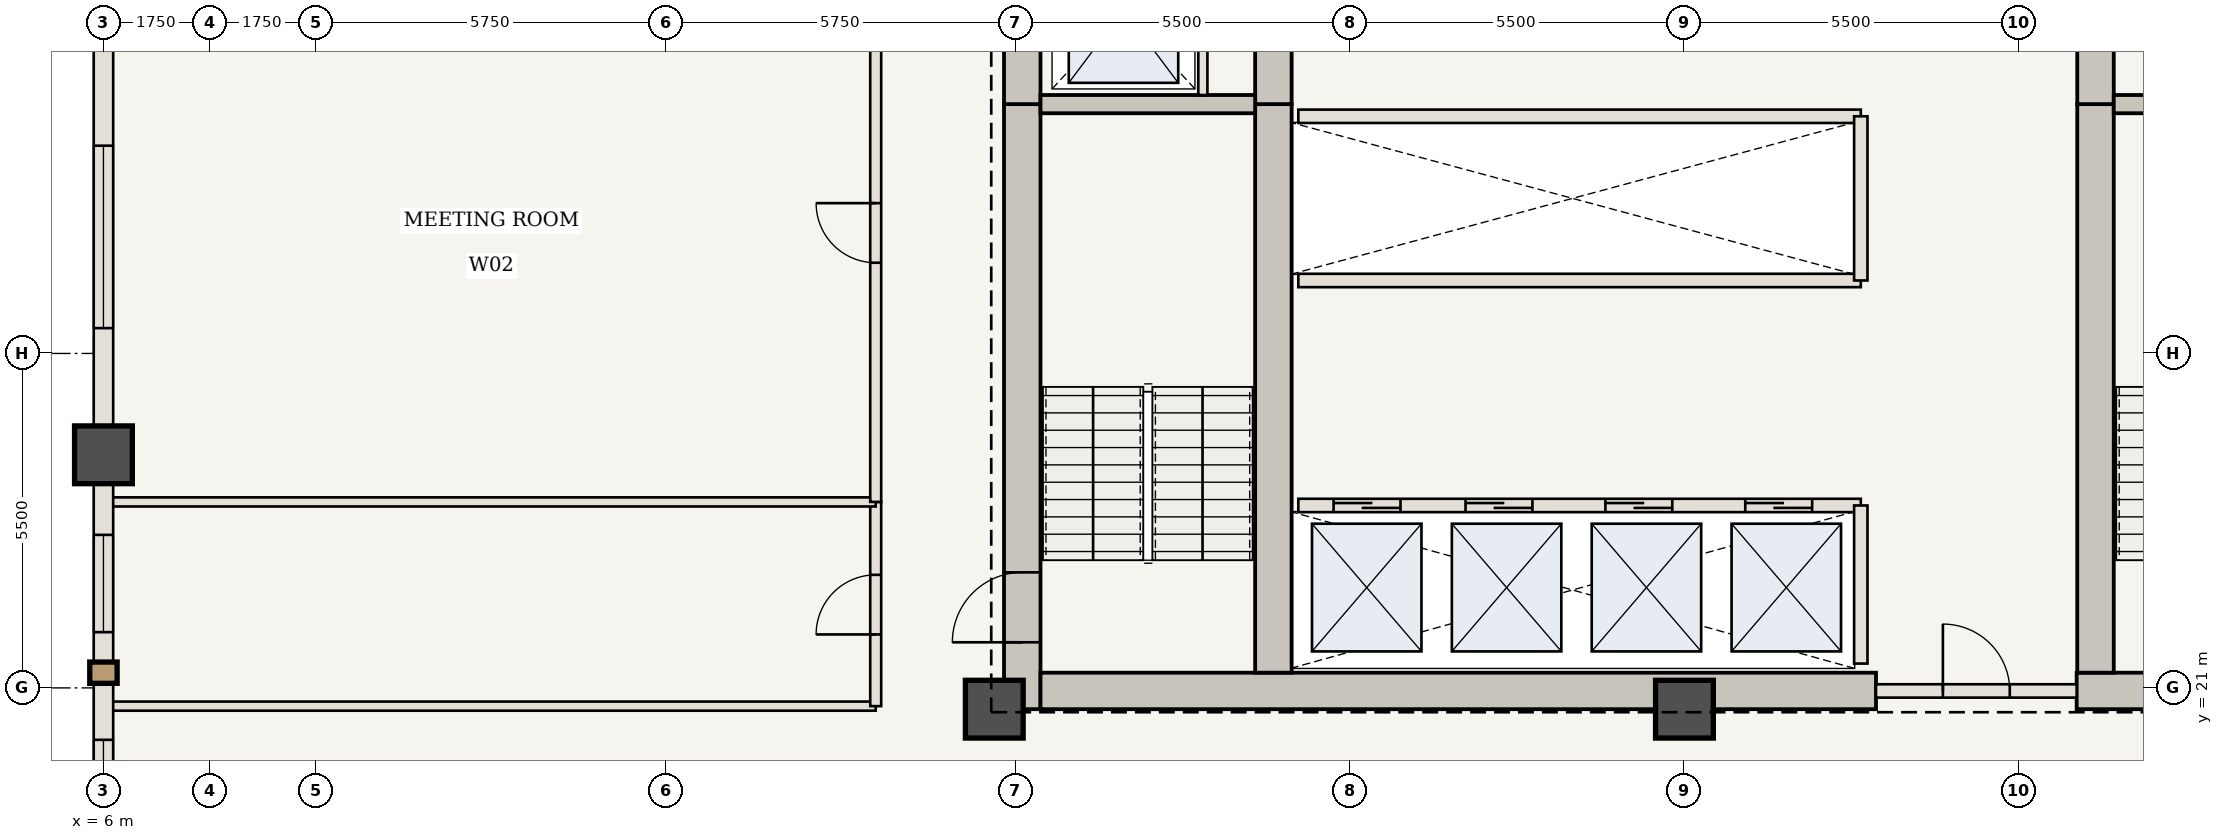
"""IFC4 building model, lengths in metres.
Left out: names, types, materials, properties, quantities, classifications, styles, units other than length and angle.
Written with IfcOpenShell. Run it as: python <this file> out.ifc"""

import sys

from ifc_helpers import new_model, si_unit, direction, frame, frame_2d, origin, origin_2d, place, context, subcontext, project, spatial, rectangle, extrude, element, fill, save


model = new_model("IFC4")
c1 = context("Model", 3, precision=1e-05, world=origin(), true_north=direction((0.0, 1.0)))
c2 = subcontext(c1, "Body", "Model", "MODEL_VIEW")
j1 = project(units=[si_unit("LENGTHUNIT", "METRE"), si_unit("PLANEANGLEUNIT", "RADIAN")], contexts=[c1])
p1 = place(None, origin())
s1 = spatial("IfcSite", under=j1, at=p1, CompositionType="ELEMENT")
p2 = place(p1, origin())
s2 = spatial("IfcBuilding", under=s1, at=p2, CompositionType="ELEMENT")
p3 = place(p2, frame((0.0, 0.0, 137.55)))
s3 = spatial("IfcBuildingStorey", under=s2, at=p3, CompositionType="ELEMENT", Elevation=137.55)
p4 = place(p3, frame((21.11, 20.65, 0.0), z_axis=(0.0, 0.0, 1.0), x_axis=(0.0, 1.0, 0.0)))
e1 = element("IfcWall", 1, at=p4, inside=s3, PredefinedType="SHEAR", context=c2, shape_type="SweptSolid", body=[
    extrude(rectangle(XDim=9.95, YDim=0.6, at=frame_2d((4.975, 0.0))), origin(), (0.0, 0.0, 1.0), 3.85),
])
p5 = place(p4, frame((1.1, 0.0, 0.0)))
e2 = element("IfcOpeningElement", 2, at=p5, cuts=e1, PredefinedType="OPENING", context=c2, shape_type="SweptSolid", body=[
    extrude(rectangle(XDim=1.15, YDim=2.15, at=frame_2d((0.575, 1.075))), frame((0.0, 0.31, 0.0), z_axis=(0.0, -1.0, 0.0), x_axis=(1.0, 0.0, 0.0)), (0.0, 0.0, 1.0), 0.62),
])
p6 = place(p3, frame((21.11, 30.6, 0.0), z_axis=(0.0, 0.0, 1.0), x_axis=(0.0, 1.0, 0.0)))
e3 = element("IfcWall", 3, at=p6, inside=s3, PredefinedType="SHEAR", context=c2, shape_type="SweptSolid", body=[
    extrude(rectangle(XDim=12.7, YDim=0.6, at=frame_2d((6.35, 0.0))), origin(), (0.0, 0.0, 1.0), 3.85),
])
p7 = place(p6, frame((4.2, 0.0, 0.0)))
e4 = element("IfcOpeningElement", 4, at=p7, cuts=e3, PredefinedType="OPENING", context=c2, shape_type="SweptSolid", body=[
    extrude(rectangle(XDim=1.1, YDim=2.15, at=frame_2d((0.55, 1.075))), frame((0.0, 0.31, 0.0), z_axis=(0.0, -1.0, 0.0), x_axis=(1.0, 0.0, 0.0)), (0.0, 0.0, 1.0), 0.62),
])
p8 = place(p6, frame((9.2, 0.0, 0.0)))
e5 = element("IfcOpeningElement", 5, at=p8, cuts=e3, PredefinedType="OPENING", context=c2, shape_type="SweptSolid", body=[
    extrude(rectangle(XDim=0.92, YDim=2.1, at=frame_2d((0.46, 1.05))), frame((0.0, 0.31, 0.0), z_axis=(0.0, -1.0, 0.0), x_axis=(1.0, 0.0, 0.0)), (0.0, 0.0, 1.0), 0.62),
])
p9 = place(p3, frame((21.41, 20.95, 0.0), z_axis=(0.0, 0.0, 1.0), x_axis=(1.0, 0.0, 0.0)))
e6 = element("IfcWall", 6, at=p9, inside=s3, PredefinedType="SHEAR", context=c2, shape_type="SweptSolid", body=[
    extrude(rectangle(XDim=13.74, YDim=0.6, at=frame_2d((6.87, 0.0))), origin(), (0.0, 0.0, 1.0), 3.85),
])
p10 = place(p3, frame((38.45, 20.95, 0.0), z_axis=(0.0, 0.0, 1.0), x_axis=(1.0, 0.0, 0.0)))
e7 = element("IfcWall", 7, at=p10, inside=s3, PredefinedType="SHEAR", context=c2, shape_type="SweptSolid", body=[
    extrude(rectangle(XDim=4.14, YDim=0.6, at=frame_2d((2.07, 0.0))), origin(), (0.0, 0.0, 1.0), 3.85),
])
p11 = place(p3, frame((25.24, 21.25, 0.0), z_axis=(0.0, 0.0, 1.0), x_axis=(0.0, 1.0, 0.0)))
e8 = element("IfcWall", 8, at=p11, inside=s3, PredefinedType="SHEAR", context=c2, shape_type="SweptSolid", body=[
    extrude(rectangle(XDim=9.35, YDim=0.6, at=frame_2d((4.675, 0.0))), origin(), (0.0, 0.0, 1.0), 3.85),
])
p12 = place(p3, frame((25.24, 30.6, 0.0), z_axis=(0.0, 0.0, 1.0), x_axis=(0.0, 1.0, 0.0)))
e9 = element("IfcWall", 9, at=p12, inside=s3, PredefinedType="SHEAR", context=c2, shape_type="SweptSolid", body=[
    extrude(rectangle(XDim=12.1, YDim=0.6, at=frame_2d((6.05, 0.0))), origin(), (0.0, 0.0, 1.0), 3.85),
])
p13 = place(p12, frame((6.25, 0.0, 0.0)))
e10 = element("IfcOpeningElement", 10, at=p13, cuts=e9, PredefinedType="OPENING", context=c2, shape_type="SweptSolid", body=[
    extrude(rectangle(XDim=1.1, YDim=2.15, at=frame_2d((0.55, 1.075))), frame((0.0, 0.31, 0.0), z_axis=(0.0, -1.0, 0.0), x_axis=(1.0, 0.0, 0.0)), (0.0, 0.0, 1.0), 0.62),
])
p14 = place(p3, frame((38.76, 21.25, 0.0), z_axis=(0.0, 0.0, 1.0), x_axis=(0.0, 1.0, 0.0)))
e11 = element("IfcWall", 11, at=p14, inside=s3, PredefinedType="SHEAR", context=c2, shape_type="SweptSolid", body=[
    extrude(rectangle(XDim=9.35, YDim=0.6, at=frame_2d((4.675, 0.0))), origin(), (0.0, 0.0, 1.0), 3.85),
])
p15 = place(p3, frame((38.76, 30.6, 0.0), z_axis=(0.0, 0.0, 1.0), x_axis=(0.0, 1.0, 0.0)))
e12 = element("IfcWall", 12, at=p15, inside=s3, PredefinedType="SHEAR", context=c2, shape_type="SweptSolid", body=[
    extrude(rectangle(XDim=12.1, YDim=0.6, at=frame_2d((6.05, 0.0))), origin(), (0.0, 0.0, 1.0), 3.85),
])
for number, where, z_axis, x_axis in (
    (13, (20.65, 20.65, 0.0), (0.0, 0.0, 1.0), (1.0, 0.0, 0.0)),
    (14, (32.0, 20.65, 0.0), (0.0, 0.0, 1.0), (1.0, 0.0, 0.0)),
    (15, (6.0, 24.833, 0.0), (0.0, 0.0, 1.0), (1.0, 0.0, 0.0)),
):
    element("IfcColumn", number, at=place(p3, frame(where, z_axis=z_axis, x_axis=x_axis)), inside=s3, PredefinedType="COLUMN", context=c2, shape_type="SweptSolid", body=[
        extrude(rectangle(XDim=0.95, YDim=0.95, at=origin_2d()), origin(), (0.0, 0.0, 1.0), 3.85),
    ])
for number, where, z_axis, x_axis in (
    (16, (21.41, 30.6, 0.0), (0.0, 0.0, 1.0), (1.0, 0.0, 0.0)),
    (17, (39.06, 30.6, 0.0), (0.0, 0.0, 1.0), (1.0, 0.0, 0.0)),
):
    element("IfcWall", number, at=place(p3, frame(where, z_axis=z_axis, x_axis=x_axis)), inside=s3, PredefinedType="SHEAR", context=c2, shape_type="SweptSolid", body=[
        extrude(rectangle(XDim=3.53, YDim=0.3, at=frame_2d((1.765, 0.0))), origin(), (0.0, 0.0, 1.0), 3.685),
    ])
p16 = place(p3, frame((24.08, 30.75, 0.0), z_axis=(0.0, 0.0, 1.0), x_axis=(0.0, 1.0, 0.0)))
e18 = element("IfcWall", 18, at=p16, inside=s3, PredefinedType="STANDARD", context=c2, shape_type="SweptSolid", body=[
    extrude(rectangle(XDim=2.65, YDim=0.15, at=frame_2d((1.325, 0.0))), origin(), (0.0, 0.0, 1.0), 3.685),
])
p17 = place(p3, frame((35.15, 20.95, 0.0), z_axis=(0.0, 0.0, 1.0), x_axis=(1.0, 0.0, 0.0)))
e19 = element("IfcWall", 19, at=p17, inside=s3, PredefinedType="STANDARD", context=c2, shape_type="SweptSolid", body=[
    extrude(rectangle(XDim=3.3, YDim=0.22, at=frame_2d((1.65, 0.0))), origin(), (0.0, 0.0, 1.0), 3.685),
])
p18 = place(p17, frame((1.1, 0.0, 0.0)))
e20 = element("IfcOpeningElement", 20, at=p18, cuts=e19, PredefinedType="OPENING", context=c2, shape_type="SweptSolid", body=[
    extrude(rectangle(XDim=1.1, YDim=2.15, at=frame_2d((0.55, 1.075))), frame((0.0, 0.12, 0.0), z_axis=(0.0, -1.0, 0.0), x_axis=(1.0, 0.0, 0.0)), (0.0, 0.0, 1.0), 0.24),
])
p19 = place(p3, frame((25.65, 24.0, 0.0), z_axis=(0.0, 0.0, 1.0), x_axis=(1.0, 0.0, 0.0)))
e21 = element("IfcWall", 21, at=p19, inside=s3, PredefinedType="STANDARD", context=c2, shape_type="SweptSolid", body=[
    extrude(rectangle(XDim=9.25, YDim=0.22, at=frame_2d((4.625, 0.0))), origin(), (0.0, 0.0, 1.0), 3.685),
])
p20 = place(p19, frame((0.58, 0.0, 0.0)))
e22 = element("IfcOpeningElement", 22, at=p20, cuts=e21, PredefinedType="OPENING", context=c2, shape_type="SweptSolid", body=[
    extrude(rectangle(XDim=1.1, YDim=2.15, at=frame_2d((0.55, 1.075))), frame((0.0, 0.12, 0.0), z_axis=(0.0, -1.0, 0.0), x_axis=(1.0, 0.0, 0.0)), (0.0, 0.0, 1.0), 0.24),
])
p21 = place(p19, frame((2.75, 0.0, 0.0)))
e23 = element("IfcOpeningElement", 23, at=p21, cuts=e21, PredefinedType="OPENING", context=c2, shape_type="SweptSolid", body=[
    extrude(rectangle(XDim=1.1, YDim=2.15, at=frame_2d((0.55, 1.075))), frame((0.0, 0.12, 0.0), z_axis=(0.0, -1.0, 0.0), x_axis=(1.0, 0.0, 0.0)), (0.0, 0.0, 1.0), 0.24),
])
p22 = place(p19, frame((5.05, 0.0, 0.0)))
e24 = element("IfcOpeningElement", 24, at=p22, cuts=e21, PredefinedType="OPENING", context=c2, shape_type="SweptSolid", body=[
    extrude(rectangle(XDim=1.1, YDim=2.15, at=frame_2d((0.55, 1.075))), frame((0.0, 0.12, 0.0), z_axis=(0.0, -1.0, 0.0), x_axis=(1.0, 0.0, 0.0)), (0.0, 0.0, 1.0), 0.24),
])
p23 = place(p19, frame((7.35, 0.0, 0.0)))
e25 = element("IfcOpeningElement", 25, at=p23, cuts=e21, PredefinedType="OPENING", context=c2, shape_type="SweptSolid", body=[
    extrude(rectangle(XDim=1.1, YDim=2.15, at=frame_2d((0.55, 1.075))), frame((0.0, 0.12, 0.0), z_axis=(0.0, -1.0, 0.0), x_axis=(1.0, 0.0, 0.0)), (0.0, 0.0, 1.0), 0.24),
])
p24 = place(p3, frame((34.9, 21.4, 0.0), z_axis=(0.0, 0.0, 1.0), x_axis=(0.0, 1.0, 0.0)))
e26 = element("IfcWall", 26, at=p24, inside=s3, PredefinedType="STANDARD", context=c2, shape_type="SweptSolid", body=[
    extrude(rectangle(XDim=2.6, YDim=0.22, at=frame_2d((1.3, 0.0))), origin(), (0.0, 0.0, 1.0), 3.685),
])
for number, where, z_axis, x_axis in (
    (27, (25.65, 27.7, 0.0), (0.0, 0.0, 1.0), (1.0, 0.0, 0.0)),
    (28, (25.65, 30.4, 0.0), (0.0, 0.0, 1.0), (1.0, 0.0, 0.0)),
):
    element("IfcWall", number, at=place(p3, frame(where, z_axis=z_axis, x_axis=x_axis)), inside=s3, PredefinedType="STANDARD", context=c2, shape_type="SweptSolid", body=[
        extrude(rectangle(XDim=9.25, YDim=0.22, at=frame_2d((4.625, 0.0))), origin(), (0.0, 0.0, 1.0), 3.685),
    ])
p25 = place(p3, frame((34.9, 27.7, 0.0), z_axis=(0.0, 0.0, 1.0), x_axis=(0.0, 1.0, 0.0)))
e29 = element("IfcWall", 29, at=p25, inside=s3, PredefinedType="STANDARD", context=c2, shape_type="SweptSolid", body=[
    extrude(rectangle(XDim=2.7, YDim=0.22, at=frame_2d((1.35, 0.0))), origin(), (0.0, 0.0, 1.0), 3.685),
])
p26 = place(p3, frame((6.06, 20.7, 0.0), z_axis=(0.0, 0.0, 1.0), x_axis=(1.0, 0.0, 0.0)))
e30 = element("IfcWall", 30, at=p26, inside=s3, PredefinedType="STANDARD", context=c2, shape_type="SweptSolid", body=[
    extrude(rectangle(XDim=12.64, YDim=0.15, at=frame_2d((6.32, 0.0))), origin(), (0.0, 0.0, 1.0), 3.065),
])
p27 = place(p3, frame((18.7, 20.7, 0.0), z_axis=(0.0, 0.0, 1.0), x_axis=(0.0, 1.0, 0.0)))
e31 = element("IfcWall", 31, at=p27, inside=s3, PredefinedType="STANDARD", context=c2, shape_type="SweptSolid", body=[
    extrude(rectangle(XDim=3.358, YDim=0.18, at=frame_2d((1.679, 0.0))), origin(), (0.0, 0.0, 1.0), 3.685),
])
p28 = place(p27, frame((1.179, 0.0, 0.0)))
e32 = element("IfcOpeningElement", 32, at=p28, cuts=e31, PredefinedType="OPENING", context=c2, shape_type="SweptSolid", body=[
    extrude(rectangle(XDim=0.98, YDim=2.2, at=frame_2d((0.49, 1.1))), frame((0.0, 0.1, 0.0), z_axis=(0.0, -1.0, 0.0), x_axis=(1.0, 0.0, 0.0)), (0.0, 0.0, 1.0), 0.2),
])
p29 = place(p3, frame((6.06, 24.058, 0.0), z_axis=(0.0, 0.0, 1.0), x_axis=(1.0, 0.0, 0.0)))
e33 = element("IfcWall", 33, at=p29, inside=s3, PredefinedType="STANDARD", context=c2, shape_type="SweptSolid", body=[
    extrude(rectangle(XDim=12.64, YDim=0.15, at=frame_2d((6.32, 0.0))), origin(), (0.0, 0.0, 1.0), 3.685),
])
p30 = place(p3, frame((18.7, 24.058, 0.0), z_axis=(0.0, 0.0, 1.0), x_axis=(0.0, 1.0, 0.0)))
e34 = element("IfcWall", 34, at=p30, inside=s3, PredefinedType="STANDARD", context=c2, shape_type="SweptSolid", body=[
    extrude(rectangle(XDim=8.867, YDim=0.18, at=frame_2d((4.433, 0.0))), origin(), (0.0, 0.0, 1.0), 3.685),
])
p31 = place(p30, frame((3.933, 0.0, 0.0)))
e35 = element("IfcOpeningElement", 35, at=p31, cuts=e34, PredefinedType="OPENING", context=c2, shape_type="SweptSolid", body=[
    extrude(rectangle(XDim=0.98, YDim=2.2, at=frame_2d((0.49, 1.1))), frame((0.0, 0.1, 0.0), z_axis=(0.0, -1.0, 0.0), x_axis=(1.0, 0.0, 0.0)), (0.0, 0.0, 1.0), 0.2),
])
p32 = place(p3, frame((6.0, 17.667, 0.0), z_axis=(0.0, 0.0, 1.0), x_axis=(0.0, 1.0, 0.0)))
e36 = element("IfcWall", 36, at=p32, inside=s3, PredefinedType="USERDEFINED", context=c2, shape_type="SweptSolid", body=[
    extrude(rectangle(XDim=7.167, YDim=0.32, at=frame_2d((3.583, 0.0))), origin(), (0.0, 0.0, 1.0), 2.885),
])
p33 = place(p32, frame((0.879, 0.0, 0.85)))
e37 = element("IfcOpeningElement", 37, at=p33, cuts=e36, PredefinedType="OPENING", context=c2, shape_type="SweptSolid", body=[
    extrude(rectangle(XDim=1.6, YDim=1.835, at=frame_2d((0.8, 0.917))), frame((0.0, 0.17, 0.0), z_axis=(0.0, -1.0, 0.0), x_axis=(1.0, 0.0, 0.0)), (0.0, 0.0, 1.0), 0.34),
])
p34 = place(p32, frame((4.25, 0.0, 0.85)))
e38 = element("IfcOpeningElement", 38, at=p34, cuts=e36, PredefinedType="OPENING", context=c2, shape_type="SweptSolid", body=[
    extrude(rectangle(XDim=1.6, YDim=1.835, at=frame_2d((0.8, 0.917))), frame((0.0, 0.17, 0.0), z_axis=(0.0, -1.0, 0.0), x_axis=(1.0, 0.0, 0.0)), (0.0, 0.0, 1.0), 0.34),
])
p35 = place(p3, frame((6.0, 24.833, 0.0), z_axis=(0.0, 0.0, 1.0), x_axis=(0.0, 1.0, 0.0)))
e39 = element("IfcWall", 39, at=p35, inside=s3, PredefinedType="USERDEFINED", context=c2, shape_type="SweptSolid", body=[
    extrude(rectangle(XDim=7.167, YDim=0.32, at=frame_2d((3.583, 0.0))), origin(), (0.0, 0.0, 1.0), 2.885),
])
p36 = place(p35, frame((2.083, 0.0, 0.85)))
e40 = element("IfcOpeningElement", 40, at=p36, cuts=e39, PredefinedType="OPENING", context=c2, shape_type="SweptSolid", body=[
    extrude(rectangle(XDim=3.0, YDim=1.835, at=frame_2d((1.5, 0.917))), frame((0.0, 0.17, 0.0), z_axis=(0.0, -1.0, 0.0), x_axis=(1.0, 0.0, 0.0)), (0.0, 0.0, 1.0), 0.34),
])
p37 = place(p5, origin())
e41 = element("IfcDoor", 41, at=p37, inside=s3, OperationType="SINGLE_SWING_LEFT", PredefinedType="DOOR", context=c2, shape_type="SweptSolid", body=[
    extrude(rectangle(XDim=1.15, YDim=2.15, at=frame_2d((0.575, 1.075))), frame((0.0, 0.025, 0.0), z_axis=(0.0, -1.0, 0.0), x_axis=(1.0, 0.0, 0.0)), (0.0, 0.0, 1.0), 0.05),
])
fill(e2, e41)
p38 = place(p18, origin())
e42 = element("IfcDoor", 42, at=p38, inside=s3, OperationType="SINGLE_SWING_LEFT", PredefinedType="DOOR", context=c2, shape_type="SweptSolid", body=[
    extrude(rectangle(XDim=1.1, YDim=2.15, at=frame_2d((0.55, 1.075))), frame((0.0, 0.025, 0.0), z_axis=(0.0, -1.0, 0.0), x_axis=(1.0, 0.0, 0.0)), (0.0, 0.0, 1.0), 0.05),
])
fill(e20, e42)
p39 = place(p20, origin())
e43 = element("IfcDoor", 43, at=p39, inside=s3, OperationType="DOUBLE_DOOR_SLIDING", PredefinedType="DOOR", context=c2, shape_type="SweptSolid", body=[
    extrude(rectangle(XDim=1.1, YDim=2.15, at=frame_2d((0.55, 1.075))), frame((0.0, 0.025, 0.0), z_axis=(0.0, -1.0, 0.0), x_axis=(1.0, 0.0, 0.0)), (0.0, 0.0, 1.0), 0.05),
])
fill(e22, e43)
p40 = place(p21, origin())
e44 = element("IfcDoor", 44, at=p40, inside=s3, OperationType="DOUBLE_DOOR_SLIDING", PredefinedType="DOOR", context=c2, shape_type="SweptSolid", body=[
    extrude(rectangle(XDim=1.1, YDim=2.15, at=frame_2d((0.55, 1.075))), frame((0.0, 0.025, 0.0), z_axis=(0.0, -1.0, 0.0), x_axis=(1.0, 0.0, 0.0)), (0.0, 0.0, 1.0), 0.05),
])
fill(e23, e44)
p41 = place(p22, origin())
e45 = element("IfcDoor", 45, at=p41, inside=s3, OperationType="DOUBLE_DOOR_SLIDING", PredefinedType="DOOR", context=c2, shape_type="SweptSolid", body=[
    extrude(rectangle(XDim=1.1, YDim=2.15, at=frame_2d((0.55, 1.075))), frame((0.0, 0.025, 0.0), z_axis=(0.0, -1.0, 0.0), x_axis=(1.0, 0.0, 0.0)), (0.0, 0.0, 1.0), 0.05),
])
fill(e24, e45)
p42 = place(p23, origin())
e46 = element("IfcDoor", 46, at=p42, inside=s3, OperationType="DOUBLE_DOOR_SLIDING", PredefinedType="DOOR", context=c2, shape_type="SweptSolid", body=[
    extrude(rectangle(XDim=1.1, YDim=2.15, at=frame_2d((0.55, 1.075))), frame((0.0, 0.025, 0.0), z_axis=(0.0, -1.0, 0.0), x_axis=(1.0, 0.0, 0.0)), (0.0, 0.0, 1.0), 0.05),
])
fill(e25, e46)
p43 = place(p28, origin())
e47 = element("IfcDoor", 47, at=p43, inside=s3, OperationType="SINGLE_SWING_LEFT", PredefinedType="DOOR", context=c2, shape_type="SweptSolid", body=[
    extrude(rectangle(XDim=0.98, YDim=2.2, at=frame_2d((0.49, 1.1))), frame((0.0, 0.025, 0.0), z_axis=(0.0, -1.0, 0.0), x_axis=(1.0, 0.0, 0.0)), (0.0, 0.0, 1.0), 0.05),
])
fill(e32, e47)
p44 = place(p31, origin())
e48 = element("IfcDoor", 48, at=p44, inside=s3, OperationType="SINGLE_SWING_RIGHT", PredefinedType="DOOR", context=c2, shape_type="SweptSolid", body=[
    extrude(rectangle(XDim=0.98, YDim=2.2, at=frame_2d((0.49, 1.1))), frame((0.0, 0.025, 0.0), z_axis=(0.0, -1.0, 0.0), x_axis=(1.0, 0.0, 0.0)), (0.0, 0.0, 1.0), 0.05),
])
fill(e35, e48)
p45 = place(p33, origin())
e49 = element("IfcWindow", 49, at=p45, inside=s3, PartitioningType="SINGLE_PANEL", PredefinedType="WINDOW", context=c2, shape_type="SweptSolid", body=[
    extrude(rectangle(XDim=1.6, YDim=1.835, at=frame_2d((0.8, 0.917))), frame((0.0, 0.03, 0.0), z_axis=(0.0, -1.0, 0.0), x_axis=(1.0, 0.0, 0.0)), (0.0, 0.0, 1.0), 0.06),
])
fill(e37, e49)
p46 = place(p34, origin())
e50 = element("IfcWindow", 50, at=p46, inside=s3, PartitioningType="SINGLE_PANEL", PredefinedType="WINDOW", context=c2, shape_type="SweptSolid", body=[
    extrude(rectangle(XDim=1.6, YDim=1.835, at=frame_2d((0.8, 0.917))), frame((0.0, 0.03, 0.0), z_axis=(0.0, -1.0, 0.0), x_axis=(1.0, 0.0, 0.0)), (0.0, 0.0, 1.0), 0.06),
])
fill(e38, e50)
p47 = place(p36, origin())
e51 = element("IfcWindow", 51, at=p47, inside=s3, PartitioningType="SINGLE_PANEL", PredefinedType="WINDOW", context=c2, shape_type="SweptSolid", body=[
    extrude(rectangle(XDim=3.0, YDim=1.835, at=frame_2d((1.5, 0.917))), frame((0.0, 0.03, 0.0), z_axis=(0.0, -1.0, 0.0), x_axis=(1.0, 0.0, 0.0)), (0.0, 0.0, 1.0), 0.06),
])
fill(e40, e51)
save(model, sys.argv[1])
